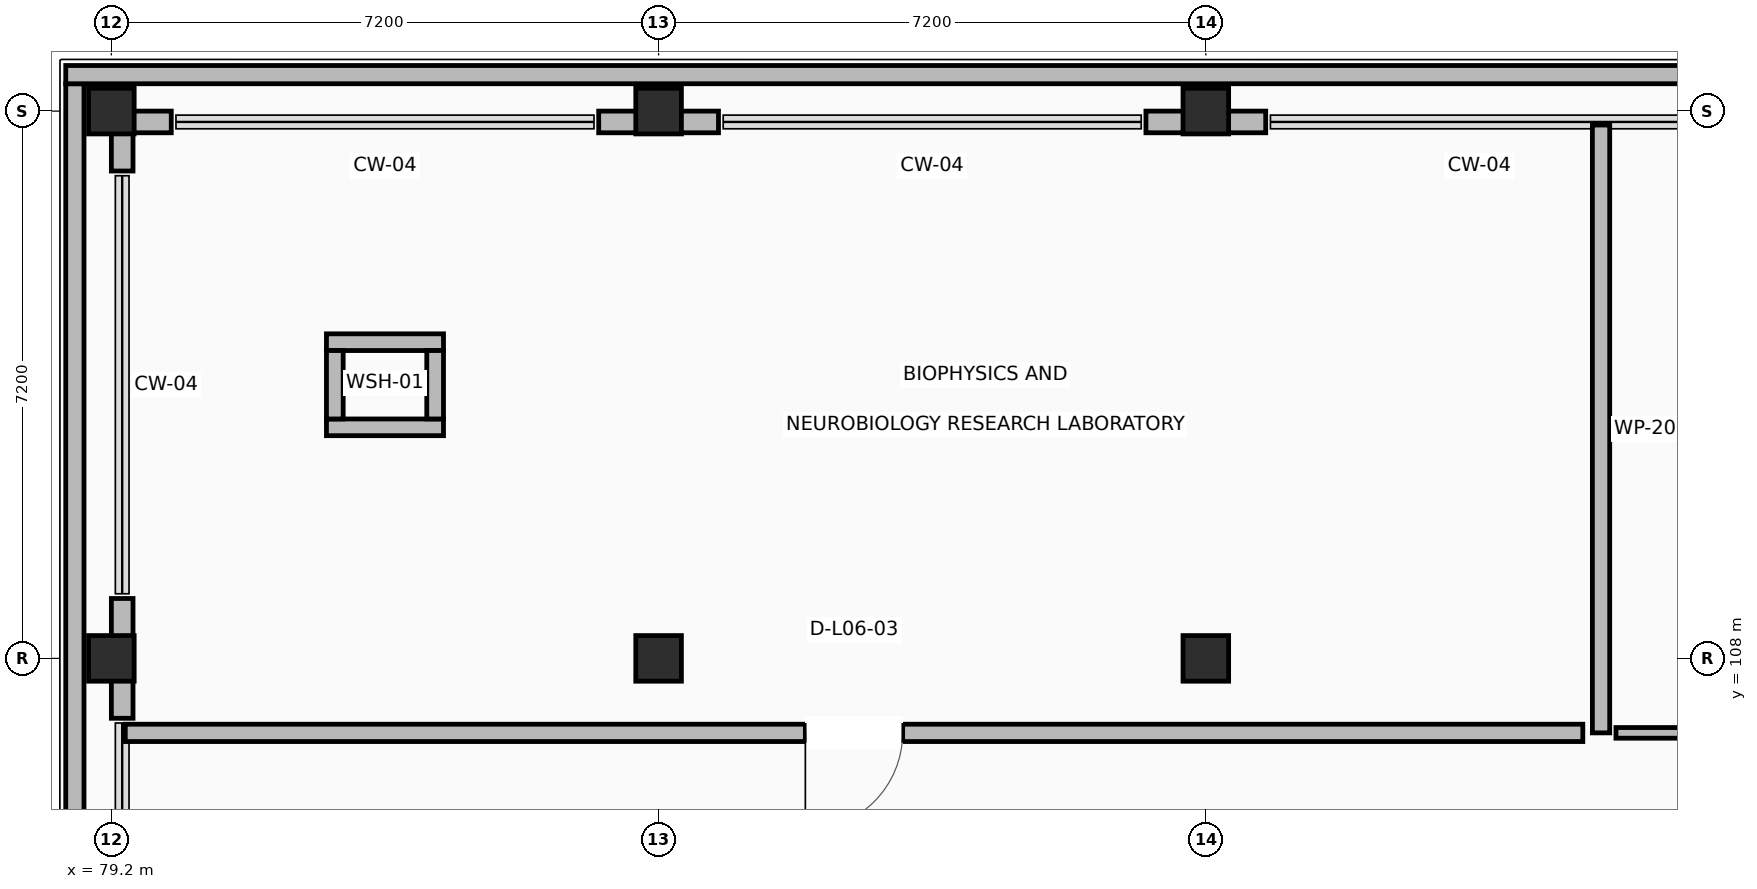
"""IFC4 building model, lengths in metres.
Left out: names, types, materials, properties, quantities, classifications, styles, units other than length and angle.
Written with IfcOpenShell. Run it as: python <this file> out.ifc"""

import sys

from ifc_helpers import new_model, si_unit, direction, frame, frame_2d, origin, origin_2d, place, context, subcontext, project, spatial, rectangle, extrude, element, fill, save


model = new_model("IFC4")
c1 = context("Model", 3, precision=1e-05, world=origin(), true_north=direction((0.0, 1.0)))
c2 = subcontext(c1, "Body", "Model", "MODEL_VIEW")
j1 = project(units=[si_unit("LENGTHUNIT", "METRE"), si_unit("PLANEANGLEUNIT", "RADIAN")], contexts=[c1])
p1 = place(None, origin())
s1 = spatial("IfcSite", under=j1, at=p1, CompositionType="ELEMENT")
p2 = place(p1, origin())
s2 = spatial("IfcBuilding", under=s1, at=p2, CompositionType="ELEMENT")
p3 = place(p2, frame((0.0, 0.0, 27.0)))
s3 = spatial("IfcBuildingStorey", under=s2, at=p3, CompositionType="ELEMENT", Elevation=27.0)
for number, where, z_axis, x_axis in (
    (1, (79.2, 108.0, 0.0), (0.0, 0.0, 1.0), (1.0, 0.0, 0.0)),
    (2, (79.2, 115.2, 0.0), (0.0, 0.0, 1.0), (1.0, 0.0, 0.0)),
    (3, (86.4, 108.0, 0.0), (0.0, 0.0, 1.0), (1.0, 0.0, 0.0)),
    (4, (86.4, 115.2, 0.0), (0.0, 0.0, 1.0), (1.0, 0.0, 0.0)),
    (5, (93.6, 108.0, 0.0), (0.0, 0.0, 1.0), (1.0, 0.0, 0.0)),
    (6, (93.6, 115.2, 0.0), (0.0, 0.0, 1.0), (1.0, 0.0, 0.0)),
):
    element("IfcColumn", number, at=place(p3, frame(where, z_axis=z_axis, x_axis=x_axis)), inside=s3, PredefinedType="COLUMN", context=c2, shape_type="SweptSolid", body=[
        extrude(rectangle(XDim=0.6, YDim=0.6, at=origin_2d()), origin(), (0.0, 0.0, 1.0), 3.92),
    ])
for number, where, z_axis, x_axis in (
    (7, (94.388, 115.058, 0.0), (0.0, 0.0, 1.0), (-1.0, 0.0, 0.0)),
    (8, (87.188, 115.058, 0.0), (0.0, 0.0, 1.0), (-1.0, 0.0, 0.0)),
):
    element("IfcWall", number, at=place(p3, frame(where, z_axis=z_axis, x_axis=x_axis)), inside=s3, PredefinedType="STANDARD", context=c2, shape_type="SweptSolid", body=[
        extrude(rectangle(XDim=1.576, YDim=0.285, at=frame_2d((0.788, 0.0))), origin(), (0.0, 0.0, 1.0), 2.96),
    ])
p4 = place(p3, frame((79.988, 115.058, 0.0), z_axis=(0.0, 0.0, 1.0), x_axis=(-1.0, 0.0, 0.0)))
e9 = element("IfcWall", 9, at=p4, inside=s3, PredefinedType="STANDARD", context=c2, shape_type="SweptSolid", body=[
    extrude(rectangle(XDim=0.788, YDim=0.285, at=frame_2d((0.394, 0.0))), origin(), (0.0, 0.0, 1.0), 2.96),
])
p5 = place(p3, frame((79.343, 114.915, 0.0), z_axis=(0.0, 0.0, 1.0), x_axis=(0.0, -1.0, 0.0)))
e10 = element("IfcWall", 10, at=p5, inside=s3, PredefinedType="STANDARD", context=c2, shape_type="SweptSolid", body=[
    extrude(rectangle(XDim=0.503, YDim=0.285, at=frame_2d((0.251, 0.0))), origin(), (0.0, 0.0, 1.0), 2.96),
])
p6 = place(p3, frame((79.343, 108.788, 0.0), z_axis=(0.0, 0.0, 1.0), x_axis=(0.0, -1.0, 0.0)))
e11 = element("IfcWall", 11, at=p6, inside=s3, PredefinedType="STANDARD", context=c2, shape_type="SweptSolid", body=[
    extrude(rectangle(XDim=1.576, YDim=0.285, at=frame_2d((0.788, 0.0))), origin(), (0.0, 0.0, 1.0), 2.96),
])
p7 = place(p3, frame((78.72, 93.24, 0.0), z_axis=(0.0, 0.0, 1.0), x_axis=(0.0, 1.0, 0.0)))
e12 = element("IfcWall", 12, at=p7, inside=s3, PredefinedType="PARAPET", context=c2, shape_type="SweptSolid", body=[
    extrude(rectangle(XDim=22.32, YDim=0.24, at=frame_2d((11.16, 0.0))), origin(), (0.0, 0.0, 1.0), 1.12),
])
p8 = place(p3, frame((78.6, 115.68, 0.0), z_axis=(0.0, 0.0, 1.0), x_axis=(1.0, 0.0, 0.0)))
e13 = element("IfcWall", 13, at=p8, inside=s3, PredefinedType="PARAPET", context=c2, shape_type="SweptSolid", body=[
    extrude(rectangle(XDim=73.2, YDim=0.24, at=frame_2d((36.6, 0.0))), origin(), (0.0, 0.0, 1.0), 1.12),
])
for number, where, z_axis, x_axis in (
    (14, (82.03, 111.04, 0.0), (0.0, 0.0, 1.0), (1.0, 0.0, 0.0)),
    (15, (82.03, 112.16, 0.0), (0.0, 0.0, 1.0), (1.0, 0.0, 0.0)),
):
    element("IfcWall", number, at=place(p3, frame(where, z_axis=z_axis, x_axis=x_axis)), inside=s3, PredefinedType="STANDARD", context=c2, shape_type="SweptSolid", body=[
        extrude(rectangle(XDim=1.54, YDim=0.22, at=frame_2d((0.77, 0.0))), origin(), (0.0, 0.0, 1.0), 2.96),
    ])
for number, where, z_axis, x_axis in (
    (16, (82.14, 111.15, 0.0), (0.0, 0.0, 1.0), (0.0, 1.0, 0.0)),
    (17, (83.46, 111.15, 0.0), (0.0, 0.0, 1.0), (0.0, 1.0, 0.0)),
):
    element("IfcWall", number, at=place(p3, frame(where, z_axis=z_axis, x_axis=x_axis)), inside=s3, PredefinedType="STANDARD", context=c2, shape_type="SweptSolid", body=[
        extrude(rectangle(XDim=0.9, YDim=0.22, at=frame_2d((0.45, 0.0))), origin(), (0.0, 0.0, 1.0), 2.96),
    ])
p9 = place(p3, frame((98.8, 115.017, 0.0), z_axis=(0.0, 0.0, 1.0), x_axis=(0.0, -1.0, 0.0)))
e18 = element("IfcWall", 18, at=p9, inside=s3, PredefinedType="PARTITIONING", context=c2, shape_type="SweptSolid", body=[
    extrude(rectangle(XDim=7.997, YDim=0.228, at=frame_2d((3.999, 0.0))), origin(), (0.0, 0.0, 1.0), 2.96),
])
p10 = place(p3, frame((98.56, 107.02, 0.0), z_axis=(0.0, 0.0, 1.0), x_axis=(-1.0, 0.0, 0.0)))
e19 = element("IfcWall", 19, at=p10, inside=s3, PredefinedType="PARTITIONING", context=c2, shape_type="SweptSolid", body=[
    extrude(rectangle(XDim=19.177, YDim=0.228, at=frame_2d((9.588, 0.0))), origin(), (0.0, 0.0, 1.0), 2.96),
])
p11 = place(p10, frame((8.949, 0.0, 0.0)))
e20 = element("IfcOpeningElement", 20, at=p11, cuts=e19, PredefinedType="OPENING", context=c2, shape_type="SweptSolid", body=[
    extrude(rectangle(XDim=1.28, YDim=2.15, at=frame_2d((0.64, 1.075))), frame((0.0, 0.124, 0.0), z_axis=(0.0, -1.0, 0.0), x_axis=(1.0, 0.0, 0.0)), (0.0, 0.0, 1.0), 0.248),
])
p12 = place(p3, frame((127.648, 107.02, 0.0), z_axis=(0.0, 0.0, 1.0), x_axis=(-1.0, 0.0, 0.0)))
e21 = element("IfcWall", 21, at=p12, inside=s3, PredefinedType="PARTITIONING", context=c2, shape_type="SweptSolid", body=[
    extrude(rectangle(XDim=28.652, YDim=0.14, at=frame_2d((14.326, 0.0))), origin(), (0.0, 0.0, 1.0), 2.96),
])
p13 = place(p12, frame((13.851, 0.0, 0.0)))
e22 = element("IfcOpeningElement", 22, at=p13, cuts=e21, PredefinedType="OPENING", context=c2, shape_type="SweptSolid", body=[
    extrude(rectangle(XDim=0.95, YDim=2.1, at=frame_2d((0.475, 1.05))), frame((0.0, 0.08, 0.0), z_axis=(0.0, -1.0, 0.0), x_axis=(1.0, 0.0, 0.0)), (0.0, 0.0, 1.0), 0.16),
])
p14 = place(p11, origin())
e23 = element("IfcDoor", 23, at=p14, inside=s3, OperationType="SINGLE_SWING_RIGHT", PredefinedType="DOOR", context=c2, shape_type="SweptSolid", body=[
    extrude(rectangle(XDim=1.28, YDim=2.15, at=frame_2d((0.64, 1.075))), frame((0.0, 0.025, 0.0), z_axis=(0.0, -1.0, 0.0), x_axis=(1.0, 0.0, 0.0)), (0.0, 0.0, 1.0), 0.05),
])
fill(e20, e23)
save(model, sys.argv[1])
